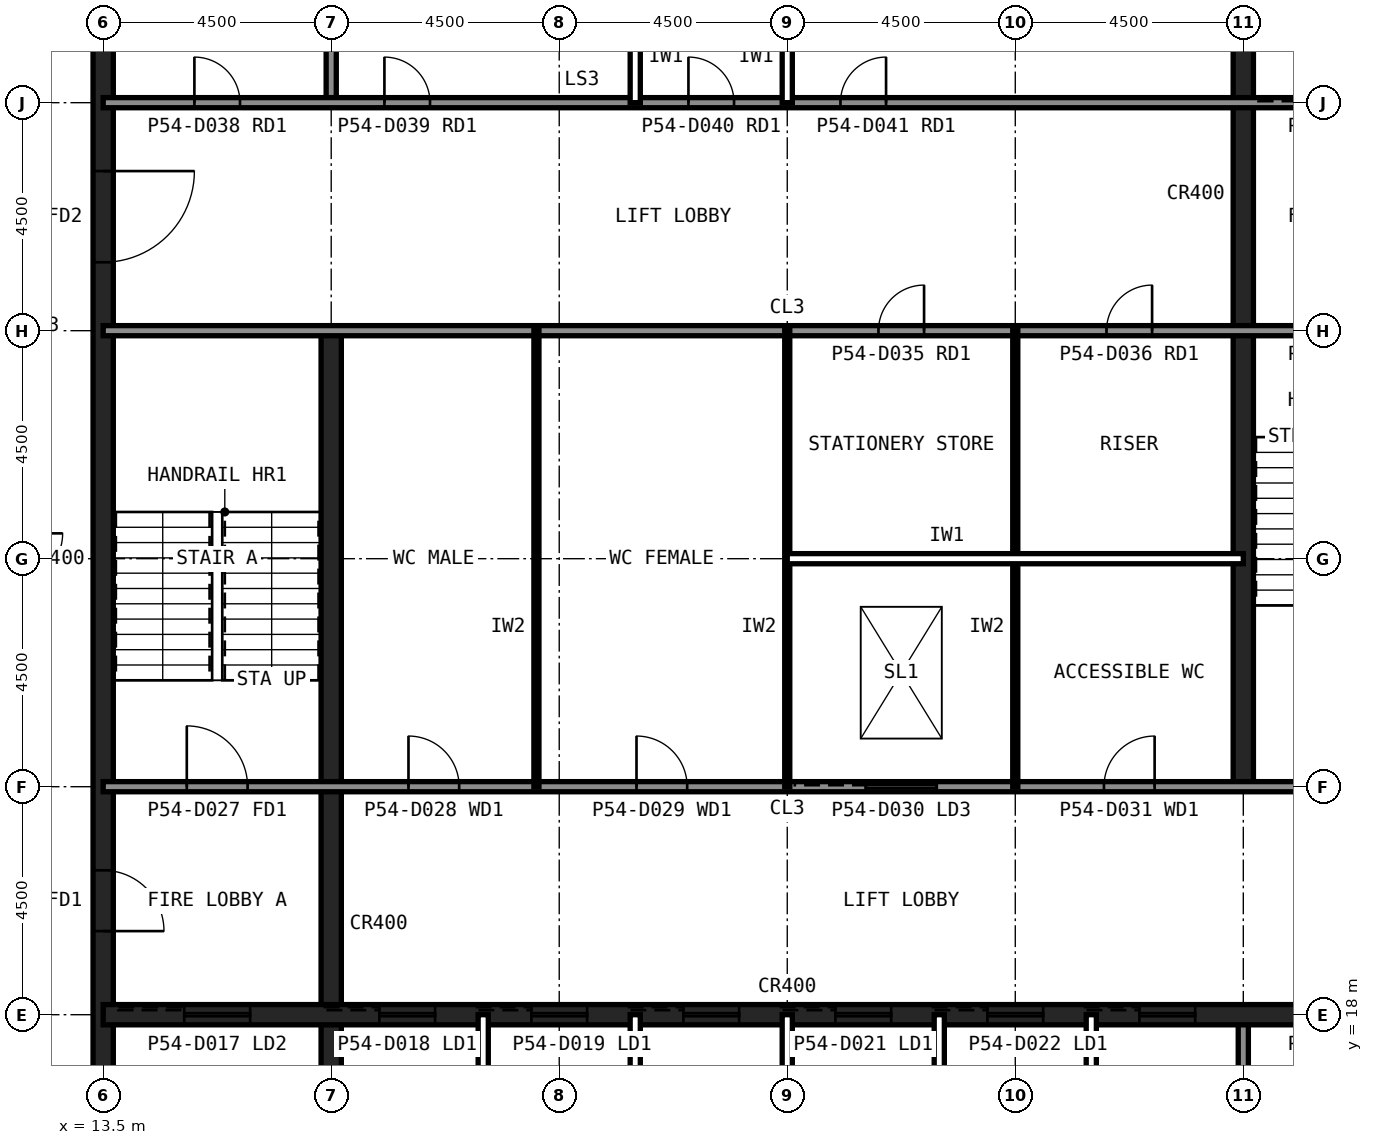
"""IFC4 building model, lengths in metres.
Left out: names, types, materials, properties, quantities, classifications, styles, units other than length and angle.
Written with IfcOpenShell. Run it as: python <this file> out.ifc"""

import sys

from ifc_helpers import new_model, si_unit, direction, frame, frame_2d, origin, place, context, subcontext, project, spatial, rectangle, extrude, element, fill, save


model = new_model("IFC4")
c1 = context("Model", 3, precision=1e-05, world=origin(), true_north=direction((0.0, 1.0)))
c2 = subcontext(c1, "Body", "Model", "MODEL_VIEW")
j1 = project(units=[si_unit("LENGTHUNIT", "METRE"), si_unit("PLANEANGLEUNIT", "RADIAN")], contexts=[c1])
p1 = place(None, origin())
s1 = spatial("IfcSite", under=j1, at=p1, CompositionType="ELEMENT")
p2 = place(p1, origin())
s2 = spatial("IfcBuilding", under=s1, at=p2, CompositionType="ELEMENT")
p3 = place(p2, frame((0.0, 0.0, 230.6)))
s3 = spatial("IfcBuildingStorey", under=s2, at=p3, CompositionType="ELEMENT", Elevation=230.6)
p4 = place(p3, frame((13.5, 40.5, 0.0), z_axis=(0.0, 0.0, 1.0), x_axis=(0.0, -1.0, 0.0)))
e1 = element("IfcWall", 1, at=p4, inside=s3, PredefinedType="SHEAR", context=c2, shape_type="SweptSolid", body=[
    extrude(rectangle(XDim=27.0, YDim=0.4, at=frame_2d((13.5, 0.0))), origin(), (0.0, 0.0, 1.0), 4.0),
])
p5 = place(p4, frame((19.65, 0.0, 0.0)))
e2 = element("IfcOpeningElement", 2, at=p5, cuts=e1, PredefinedType="OPENING", context=c2, shape_type="SweptSolid", body=[
    extrude(rectangle(XDim=1.2, YDim=2.1, at=frame_2d((0.6, 1.05))), frame((0.0, 0.21, 0.0), z_axis=(0.0, -1.0, 0.0), x_axis=(1.0, 0.0, 0.0)), (0.0, 0.0, 1.0), 0.42),
])
p6 = place(p4, frame((5.85, 0.0, 0.0)))
e3 = element("IfcOpeningElement", 3, at=p6, cuts=e1, PredefinedType="OPENING", context=c2, shape_type="SweptSolid", body=[
    extrude(rectangle(XDim=1.8, YDim=2.1, at=frame_2d((0.9, 1.05))), frame((0.0, 0.21, 0.0), z_axis=(0.0, -1.0, 0.0), x_axis=(1.0, 0.0, 0.0)), (0.0, 0.0, 1.0), 0.42),
])
p7 = place(p3, frame((18.0, 13.5, 0.0), z_axis=(0.0, 0.0, 1.0), x_axis=(0.0, 1.0, 0.0)))
e4 = element("IfcWall", 4, at=p7, inside=s3, PredefinedType="SHEAR", context=c2, shape_type="SweptSolid", body=[
    extrude(rectangle(XDim=18.0, YDim=0.4, at=frame_2d((9.0, 0.0))), origin(), (0.0, 0.0, 1.0), 4.0),
])
for number, where, z_axis, x_axis in (
    (5, (18.0, 36.0, 0.0), (0.0, 0.0, 1.0), (0.0, 1.0, 0.0)),
    (6, (36.0, 13.5, 0.0), (0.0, 0.0, 1.0), (0.0, 1.0, 0.0)),
):
    element("IfcWall", number, at=place(p3, frame(where, z_axis=z_axis, x_axis=x_axis)), inside=s3, PredefinedType="SOLIDWALL", context=c2, shape_type="SweptSolid", body=[
        extrude(rectangle(XDim=4.5, YDim=0.2, at=frame_2d((2.25, 0.0))), origin(), (0.0, 0.0, 1.0), 3.84),
    ])
p8 = place(p3, frame((36.0, 22.5, 0.0), z_axis=(0.0, 0.0, 1.0), x_axis=(0.0, 1.0, 0.0)))
e7 = element("IfcWall", 7, at=p8, inside=s3, PredefinedType="SHEAR", context=c2, shape_type="SweptSolid", body=[
    extrude(rectangle(XDim=18.0, YDim=0.4, at=frame_2d((9.0, 0.0))), origin(), (0.0, 0.0, 1.0), 4.0),
])
p9 = place(p3, frame((13.5, 18.0, 0.0), z_axis=(0.0, 0.0, 1.0), x_axis=(1.0, 0.0, 0.0)))
e8 = element("IfcWall", 8, at=p9, inside=s3, PredefinedType="SHEAR", context=c2, shape_type="SweptSolid", body=[
    extrude(rectangle(XDim=27.0, YDim=0.4, at=frame_2d((13.5, 0.0))), origin(), (0.0, 0.0, 1.0), 4.0),
])
p10 = place(p9, frame((24.3, 0.0, 0.0)))
e9 = element("IfcOpeningElement", 9, at=p10, cuts=e8, PredefinedType="OPENING", context=c2, shape_type="SweptSolid", body=[
    extrude(rectangle(XDim=0.9, YDim=2.1, at=frame_2d((0.45, 1.05))), frame((0.0, 0.21, 0.0), z_axis=(0.0, -1.0, 0.0), x_axis=(1.0, 0.0, 0.0)), (0.0, 0.0, 1.0), 0.42),
])
p11 = place(p9, frame((5.45, 0.0, 0.0)))
e10 = element("IfcOpeningElement", 10, at=p11, cuts=e8, PredefinedType="OPENING", context=c2, shape_type="SweptSolid", body=[
    extrude(rectangle(XDim=1.1, YDim=2.1, at=frame_2d((0.55, 1.05))), frame((0.0, 0.21, 0.0), z_axis=(0.0, -1.0, 0.0), x_axis=(1.0, 0.0, 0.0)), (0.0, 0.0, 1.0), 0.42),
])
p12 = place(p9, frame((8.45, 0.0, 0.0)))
e11 = element("IfcOpeningElement", 11, at=p12, cuts=e8, PredefinedType="OPENING", context=c2, shape_type="SweptSolid", body=[
    extrude(rectangle(XDim=1.1, YDim=2.1, at=frame_2d((0.55, 1.05))), frame((0.0, 0.21, 0.0), z_axis=(0.0, -1.0, 0.0), x_axis=(1.0, 0.0, 0.0)), (0.0, 0.0, 1.0), 0.42),
])
p13 = place(p9, frame((11.45, 0.0, 0.0)))
e12 = element("IfcOpeningElement", 12, at=p13, cuts=e8, PredefinedType="OPENING", context=c2, shape_type="SweptSolid", body=[
    extrude(rectangle(XDim=1.1, YDim=2.1, at=frame_2d((0.55, 1.05))), frame((0.0, 0.21, 0.0), z_axis=(0.0, -1.0, 0.0), x_axis=(1.0, 0.0, 0.0)), (0.0, 0.0, 1.0), 0.42),
])
p14 = place(p9, frame((14.45, 0.0, 0.0)))
e13 = element("IfcOpeningElement", 13, at=p14, cuts=e8, PredefinedType="OPENING", context=c2, shape_type="SweptSolid", body=[
    extrude(rectangle(XDim=1.1, YDim=2.1, at=frame_2d((0.55, 1.05))), frame((0.0, 0.21, 0.0), z_axis=(0.0, -1.0, 0.0), x_axis=(1.0, 0.0, 0.0)), (0.0, 0.0, 1.0), 0.42),
])
p15 = place(p9, frame((17.45, 0.0, 0.0)))
e14 = element("IfcOpeningElement", 14, at=p15, cuts=e8, PredefinedType="OPENING", context=c2, shape_type="SweptSolid", body=[
    extrude(rectangle(XDim=1.1, YDim=2.1, at=frame_2d((0.55, 1.05))), frame((0.0, 0.21, 0.0), z_axis=(0.0, -1.0, 0.0), x_axis=(1.0, 0.0, 0.0)), (0.0, 0.0, 1.0), 0.42),
])
p16 = place(p9, frame((20.45, 0.0, 0.0)))
e15 = element("IfcOpeningElement", 15, at=p16, cuts=e8, PredefinedType="OPENING", context=c2, shape_type="SweptSolid", body=[
    extrude(rectangle(XDim=1.1, YDim=2.1, at=frame_2d((0.55, 1.05))), frame((0.0, 0.21, 0.0), z_axis=(0.0, -1.0, 0.0), x_axis=(1.0, 0.0, 0.0)), (0.0, 0.0, 1.0), 0.42),
])
p17 = place(p9, frame((1.6, 0.0, 0.0)))
e16 = element("IfcOpeningElement", 16, at=p17, cuts=e8, PredefinedType="OPENING", context=c2, shape_type="SweptSolid", body=[
    extrude(rectangle(XDim=1.3, YDim=2.2, at=frame_2d((0.65, 1.1))), frame((0.0, 0.21, 0.0), z_axis=(0.0, -1.0, 0.0), x_axis=(1.0, 0.0, 0.0)), (0.0, 0.0, 1.0), 0.42),
])
p18 = place(p3, frame((13.5, 36.0, 0.0), z_axis=(0.0, 0.0, 1.0), x_axis=(1.0, 0.0, 0.0)))
e17 = element("IfcWall", 17, at=p18, inside=s3, PredefinedType="SOLIDWALL", context=c2, shape_type="SweptSolid", body=[
    extrude(rectangle(XDim=27.0, YDim=0.2, at=frame_2d((13.5, 0.0))), origin(), (0.0, 0.0, 1.0), 3.84),
])
p19 = place(p18, frame((1.8, 0.0, 0.0)))
e18 = element("IfcOpeningElement", 18, at=p19, cuts=e17, PredefinedType="OPENING", context=c2, shape_type="SweptSolid", body=[
    extrude(rectangle(XDim=0.9, YDim=2.1, at=frame_2d((0.45, 1.05))), frame((0.0, 0.11, 0.0), z_axis=(0.0, -1.0, 0.0), x_axis=(1.0, 0.0, 0.0)), (0.0, 0.0, 1.0), 0.22),
])
p20 = place(p18, frame((5.55, 0.0, 0.0)))
e19 = element("IfcOpeningElement", 19, at=p20, cuts=e17, PredefinedType="OPENING", context=c2, shape_type="SweptSolid", body=[
    extrude(rectangle(XDim=0.9, YDim=2.1, at=frame_2d((0.45, 1.05))), frame((0.0, 0.11, 0.0), z_axis=(0.0, -1.0, 0.0), x_axis=(1.0, 0.0, 0.0)), (0.0, 0.0, 1.0), 0.22),
])
p21 = place(p18, frame((11.55, 0.0, 0.0)))
e20 = element("IfcOpeningElement", 20, at=p21, cuts=e17, PredefinedType="OPENING", context=c2, shape_type="SweptSolid", body=[
    extrude(rectangle(XDim=0.9, YDim=2.1, at=frame_2d((0.45, 1.05))), frame((0.0, 0.11, 0.0), z_axis=(0.0, -1.0, 0.0), x_axis=(1.0, 0.0, 0.0)), (0.0, 0.0, 1.0), 0.22),
])
p22 = place(p18, frame((14.55, 0.0, 0.0)))
e21 = element("IfcOpeningElement", 21, at=p22, cuts=e17, PredefinedType="OPENING", context=c2, shape_type="SweptSolid", body=[
    extrude(rectangle(XDim=0.9, YDim=2.1, at=frame_2d((0.45, 1.05))), frame((0.0, 0.11, 0.0), z_axis=(0.0, -1.0, 0.0), x_axis=(1.0, 0.0, 0.0)), (0.0, 0.0, 1.0), 0.22),
])
p23 = place(p18, frame((24.1, 0.0, 0.0)))
e22 = element("IfcOpeningElement", 22, at=p23, cuts=e17, PredefinedType="OPENING", context=c2, shape_type="SweptSolid", body=[
    extrude(rectangle(XDim=1.3, YDim=2.2, at=frame_2d((0.65, 1.1))), frame((0.0, 0.11, 0.0), z_axis=(0.0, -1.0, 0.0), x_axis=(1.0, 0.0, 0.0)), (0.0, 0.0, 1.0), 0.22),
])
p24 = place(p3, frame((13.5, 22.5, 0.0), z_axis=(0.0, 0.0, 1.0), x_axis=(1.0, 0.0, 0.0)))
e23 = element("IfcWall", 23, at=p24, inside=s3, PredefinedType="SOLIDWALL", context=c2, shape_type="SweptSolid", body=[
    extrude(rectangle(XDim=27.0, YDim=0.2, at=frame_2d((13.5, 0.0))), origin(), (0.0, 0.0, 1.0), 3.84),
])
p25 = place(p24, frame((1.65, 0.0, 0.0)))
e24 = element("IfcOpeningElement", 24, at=p25, cuts=e23, PredefinedType="OPENING", context=c2, shape_type="SweptSolid", body=[
    extrude(rectangle(XDim=1.2, YDim=2.1, at=frame_2d((0.6, 1.05))), frame((0.0, 0.11, 0.0), z_axis=(0.0, -1.0, 0.0), x_axis=(1.0, 0.0, 0.0)), (0.0, 0.0, 1.0), 0.22),
])
p26 = place(p24, frame((6.025, 0.0, 0.0)))
e25 = element("IfcOpeningElement", 25, at=p26, cuts=e23, PredefinedType="OPENING", context=c2, shape_type="SweptSolid", body=[
    extrude(rectangle(XDim=1.0, YDim=2.1, at=frame_2d((0.5, 1.05))), frame((0.0, 0.11, 0.0), z_axis=(0.0, -1.0, 0.0), x_axis=(1.0, 0.0, 0.0)), (0.0, 0.0, 1.0), 0.22),
])
p27 = place(p24, frame((10.525, 0.0, 0.0)))
e26 = element("IfcOpeningElement", 26, at=p27, cuts=e23, PredefinedType="OPENING", context=c2, shape_type="SweptSolid", body=[
    extrude(rectangle(XDim=1.0, YDim=2.1, at=frame_2d((0.5, 1.05))), frame((0.0, 0.11, 0.0), z_axis=(0.0, -1.0, 0.0), x_axis=(1.0, 0.0, 0.0)), (0.0, 0.0, 1.0), 0.22),
])
p28 = place(p24, frame((19.75, 0.0, 0.0)))
e27 = element("IfcOpeningElement", 27, at=p28, cuts=e23, PredefinedType="OPENING", context=c2, shape_type="SweptSolid", body=[
    extrude(rectangle(XDim=1.0, YDim=2.1, at=frame_2d((0.5, 1.05))), frame((0.0, 0.11, 0.0), z_axis=(0.0, -1.0, 0.0), x_axis=(1.0, 0.0, 0.0)), (0.0, 0.0, 1.0), 0.22),
])
p29 = place(p24, frame((15.05, 0.0, 0.0)))
e28 = element("IfcOpeningElement", 28, at=p29, cuts=e23, PredefinedType="OPENING", context=c2, shape_type="SweptSolid", body=[
    extrude(rectangle(XDim=1.4, YDim=2.4, at=frame_2d((0.7, 1.2))), frame((0.0, 0.11, 0.0), z_axis=(0.0, -1.0, 0.0), x_axis=(1.0, 0.0, 0.0)), (0.0, 0.0, 1.0), 0.22),
])
p30 = place(p3, frame((13.5, 31.5, 0.0), z_axis=(0.0, 0.0, 1.0), x_axis=(1.0, 0.0, 0.0)))
e29 = element("IfcWall", 29, at=p30, inside=s3, PredefinedType="SOLIDWALL", context=c2, shape_type="SweptSolid", body=[
    extrude(rectangle(XDim=27.0, YDim=0.2, at=frame_2d((13.5, 0.0))), origin(), (0.0, 0.0, 1.0), 3.84),
])
p31 = place(p30, frame((24.15, 0.0, 0.0)))
e30 = element("IfcOpeningElement", 30, at=p31, cuts=e29, PredefinedType="OPENING", context=c2, shape_type="SweptSolid", body=[
    extrude(rectangle(XDim=1.2, YDim=2.1, at=frame_2d((0.6, 1.05))), frame((0.0, 0.11, 0.0), z_axis=(0.0, -1.0, 0.0), x_axis=(1.0, 0.0, 0.0)), (0.0, 0.0, 1.0), 0.22),
])
p32 = place(p30, frame((15.3, 0.0, 0.0)))
e31 = element("IfcOpeningElement", 31, at=p32, cuts=e29, PredefinedType="OPENING", context=c2, shape_type="SweptSolid", body=[
    extrude(rectangle(XDim=0.9, YDim=2.1, at=frame_2d((0.45, 1.05))), frame((0.0, 0.11, 0.0), z_axis=(0.0, -1.0, 0.0), x_axis=(1.0, 0.0, 0.0)), (0.0, 0.0, 1.0), 0.22),
])
p33 = place(p30, frame((19.8, 0.0, 0.0)))
e32 = element("IfcOpeningElement", 32, at=p33, cuts=e29, PredefinedType="OPENING", context=c2, shape_type="SweptSolid", body=[
    extrude(rectangle(XDim=0.9, YDim=2.1, at=frame_2d((0.45, 1.05))), frame((0.0, 0.11, 0.0), z_axis=(0.0, -1.0, 0.0), x_axis=(1.0, 0.0, 0.0)), (0.0, 0.0, 1.0), 0.22),
])
for number, where, z_axis, x_axis in (
    (33, (21.0, 13.5, 0.0), (0.0, 0.0, 1.0), (0.0, 1.0, 0.0)),
    (34, (24.0, 13.5, 0.0), (0.0, 0.0, 1.0), (0.0, 1.0, 0.0)),
    (35, (24.0, 36.0, 0.0), (0.0, 0.0, 1.0), (0.0, 1.0, 0.0)),
    (36, (27.0, 13.5, 0.0), (0.0, 0.0, 1.0), (0.0, 1.0, 0.0)),
    (37, (27.0, 36.0, 0.0), (0.0, 0.0, 1.0), (0.0, 1.0, 0.0)),
    (38, (30.0, 13.5, 0.0), (0.0, 0.0, 1.0), (0.0, 1.0, 0.0)),
    (39, (33.0, 13.5, 0.0), (0.0, 0.0, 1.0), (0.0, 1.0, 0.0)),
):
    element("IfcWall", number, at=place(p3, frame(where, z_axis=z_axis, x_axis=x_axis)), inside=s3, PredefinedType="PARTITIONING", context=c2, shape_type="SweptSolid", body=[
        extrude(rectangle(XDim=4.5, YDim=0.2, at=frame_2d((2.25, 0.0))), origin(), (0.0, 0.0, 1.0), 3.84),
    ])
for number, where, z_axis, x_axis in (
    (40, (22.05, 22.5, 0.0), (0.0, 0.0, 1.0), (0.0, 1.0, 0.0)),
    (41, (27.0, 22.5, 0.0), (0.0, 0.0, 1.0), (0.0, 1.0, 0.0)),
    (42, (31.5, 22.5, 0.0), (0.0, 0.0, 1.0), (0.0, 1.0, 0.0)),
):
    element("IfcWall", number, at=place(p3, frame(where, z_axis=z_axis, x_axis=x_axis)), inside=s3, PredefinedType="PLUMBINGWALL", context=c2, shape_type="SweptSolid", body=[
        extrude(rectangle(XDim=9.0, YDim=0.1, at=frame_2d((4.5, 0.0))), origin(), (0.0, 0.0, 1.0), 3.84),
    ])
p34 = place(p3, frame((27.0, 27.0, 0.0), z_axis=(0.0, 0.0, 1.0), x_axis=(1.0, 0.0, 0.0)))
e43 = element("IfcWall", 43, at=p34, inside=s3, PredefinedType="PARTITIONING", context=c2, shape_type="SweptSolid", body=[
    extrude(rectangle(XDim=9.0, YDim=0.2, at=frame_2d((4.5, 0.0))), origin(), (0.0, 0.0, 1.0), 3.84),
])
p35 = place(p5, origin())
e44 = element("IfcDoor", 44, at=p35, inside=s3, OperationType="SINGLE_SWING_RIGHT", PredefinedType="DOOR", context=c2, shape_type="SweptSolid", body=[
    extrude(rectangle(XDim=1.2, YDim=2.1, at=frame_2d((0.6, 1.05))), frame((0.0, 0.025, 0.0), z_axis=(0.0, -1.0, 0.0), x_axis=(1.0, 0.0, 0.0)), (0.0, 0.0, 1.0), 0.05),
])
fill(e2, e44)
p36 = place(p6, origin())
e45 = element("IfcDoor", 45, at=p36, inside=s3, OperationType="SINGLE_SWING_LEFT", PredefinedType="DOOR", context=c2, shape_type="SweptSolid", body=[
    extrude(rectangle(XDim=1.8, YDim=2.1, at=frame_2d((0.9, 1.05))), frame((0.0, 0.025, 0.0), z_axis=(0.0, -1.0, 0.0), x_axis=(1.0, 0.0, 0.0)), (0.0, 0.0, 1.0), 0.05),
])
fill(e3, e45)
p37 = place(p25, origin())
e46 = element("IfcDoor", 46, at=p37, inside=s3, OperationType="SINGLE_SWING_LEFT", PredefinedType="DOOR", context=c2, shape_type="SweptSolid", body=[
    extrude(rectangle(XDim=1.2, YDim=2.1, at=frame_2d((0.6, 1.05))), frame((0.0, 0.025, 0.0), z_axis=(0.0, -1.0, 0.0), x_axis=(1.0, 0.0, 0.0)), (0.0, 0.0, 1.0), 0.05),
])
fill(e24, e46)
p38 = place(p26, origin())
e47 = element("IfcDoor", 47, at=p38, inside=s3, OperationType="SINGLE_SWING_LEFT", PredefinedType="DOOR", context=c2, shape_type="SweptSolid", body=[
    extrude(rectangle(XDim=1.0, YDim=2.1, at=frame_2d((0.5, 1.05))), frame((0.0, 0.025, 0.0), z_axis=(0.0, -1.0, 0.0), x_axis=(1.0, 0.0, 0.0)), (0.0, 0.0, 1.0), 0.05),
])
fill(e25, e47)
p39 = place(p27, origin())
e48 = element("IfcDoor", 48, at=p39, inside=s3, OperationType="SINGLE_SWING_LEFT", PredefinedType="DOOR", context=c2, shape_type="SweptSolid", body=[
    extrude(rectangle(XDim=1.0, YDim=2.1, at=frame_2d((0.5, 1.05))), frame((0.0, 0.025, 0.0), z_axis=(0.0, -1.0, 0.0), x_axis=(1.0, 0.0, 0.0)), (0.0, 0.0, 1.0), 0.05),
])
fill(e26, e48)
p40 = place(p28, origin())
e49 = element("IfcDoor", 49, at=p40, inside=s3, OperationType="SINGLE_SWING_RIGHT", PredefinedType="DOOR", context=c2, shape_type="SweptSolid", body=[
    extrude(rectangle(XDim=1.0, YDim=2.1, at=frame_2d((0.5, 1.05))), frame((0.0, 0.025, 0.0), z_axis=(0.0, -1.0, 0.0), x_axis=(1.0, 0.0, 0.0)), (0.0, 0.0, 1.0), 0.05),
])
fill(e27, e49)
p41 = place(p32, origin())
e50 = element("IfcDoor", 50, at=p41, inside=s3, OperationType="SINGLE_SWING_RIGHT", PredefinedType="DOOR", context=c2, shape_type="SweptSolid", body=[
    extrude(rectangle(XDim=0.9, YDim=2.1, at=frame_2d((0.45, 1.05))), frame((0.0, 0.025, 0.0), z_axis=(0.0, -1.0, 0.0), x_axis=(1.0, 0.0, 0.0)), (0.0, 0.0, 1.0), 0.05),
])
fill(e31, e50)
p42 = place(p33, origin())
e51 = element("IfcDoor", 51, at=p42, inside=s3, OperationType="SINGLE_SWING_RIGHT", PredefinedType="DOOR", context=c2, shape_type="SweptSolid", body=[
    extrude(rectangle(XDim=0.9, YDim=2.1, at=frame_2d((0.45, 1.05))), frame((0.0, 0.025, 0.0), z_axis=(0.0, -1.0, 0.0), x_axis=(1.0, 0.0, 0.0)), (0.0, 0.0, 1.0), 0.05),
])
fill(e32, e51)
p43 = place(p19, origin())
e52 = element("IfcDoor", 52, at=p43, inside=s3, OperationType="SINGLE_SWING_LEFT", PredefinedType="DOOR", context=c2, shape_type="SweptSolid", body=[
    extrude(rectangle(XDim=0.9, YDim=2.1, at=frame_2d((0.45, 1.05))), frame((0.0, 0.025, 0.0), z_axis=(0.0, -1.0, 0.0), x_axis=(1.0, 0.0, 0.0)), (0.0, 0.0, 1.0), 0.05),
])
fill(e18, e52)
p44 = place(p20, origin())
e53 = element("IfcDoor", 53, at=p44, inside=s3, OperationType="SINGLE_SWING_LEFT", PredefinedType="DOOR", context=c2, shape_type="SweptSolid", body=[
    extrude(rectangle(XDim=0.9, YDim=2.1, at=frame_2d((0.45, 1.05))), frame((0.0, 0.025, 0.0), z_axis=(0.0, -1.0, 0.0), x_axis=(1.0, 0.0, 0.0)), (0.0, 0.0, 1.0), 0.05),
])
fill(e19, e53)
p45 = place(p21, origin())
e54 = element("IfcDoor", 54, at=p45, inside=s3, OperationType="SINGLE_SWING_LEFT", PredefinedType="DOOR", context=c2, shape_type="SweptSolid", body=[
    extrude(rectangle(XDim=0.9, YDim=2.1, at=frame_2d((0.45, 1.05))), frame((0.0, 0.025, 0.0), z_axis=(0.0, -1.0, 0.0), x_axis=(1.0, 0.0, 0.0)), (0.0, 0.0, 1.0), 0.05),
])
fill(e20, e54)
p46 = place(p22, origin())
e55 = element("IfcDoor", 55, at=p46, inside=s3, OperationType="SINGLE_SWING_RIGHT", PredefinedType="DOOR", context=c2, shape_type="SweptSolid", body=[
    extrude(rectangle(XDim=0.9, YDim=2.1, at=frame_2d((0.45, 1.05))), frame((0.0, 0.025, 0.0), z_axis=(0.0, -1.0, 0.0), x_axis=(1.0, 0.0, 0.0)), (0.0, 0.0, 1.0), 0.05),
])
fill(e21, e55)
p47 = place(p11, origin())
e56 = element("IfcDoor", 56, at=p47, inside=s3, OperationType="SLIDING_TO_LEFT", PredefinedType="DOOR", context=c2, shape_type="SweptSolid", body=[
    extrude(rectangle(XDim=1.1, YDim=2.1, at=frame_2d((0.55, 1.05))), frame((0.0, 0.025, 0.0), z_axis=(0.0, -1.0, 0.0), x_axis=(1.0, 0.0, 0.0)), (0.0, 0.0, 1.0), 0.05),
])
fill(e10, e56)
p48 = place(p12, origin())
e57 = element("IfcDoor", 57, at=p48, inside=s3, OperationType="SLIDING_TO_LEFT", PredefinedType="DOOR", context=c2, shape_type="SweptSolid", body=[
    extrude(rectangle(XDim=1.1, YDim=2.1, at=frame_2d((0.55, 1.05))), frame((0.0, 0.025, 0.0), z_axis=(0.0, -1.0, 0.0), x_axis=(1.0, 0.0, 0.0)), (0.0, 0.0, 1.0), 0.05),
])
fill(e11, e57)
p49 = place(p13, origin())
e58 = element("IfcDoor", 58, at=p49, inside=s3, OperationType="SLIDING_TO_LEFT", PredefinedType="DOOR", context=c2, shape_type="SweptSolid", body=[
    extrude(rectangle(XDim=1.1, YDim=2.1, at=frame_2d((0.55, 1.05))), frame((0.0, 0.025, 0.0), z_axis=(0.0, -1.0, 0.0), x_axis=(1.0, 0.0, 0.0)), (0.0, 0.0, 1.0), 0.05),
])
fill(e12, e58)
p50 = place(p14, origin())
e59 = element("IfcDoor", 59, at=p50, inside=s3, OperationType="SLIDING_TO_LEFT", PredefinedType="DOOR", context=c2, shape_type="SweptSolid", body=[
    extrude(rectangle(XDim=1.1, YDim=2.1, at=frame_2d((0.55, 1.05))), frame((0.0, 0.025, 0.0), z_axis=(0.0, -1.0, 0.0), x_axis=(1.0, 0.0, 0.0)), (0.0, 0.0, 1.0), 0.05),
])
fill(e13, e59)
p51 = place(p15, origin())
e60 = element("IfcDoor", 60, at=p51, inside=s3, OperationType="SLIDING_TO_LEFT", PredefinedType="DOOR", context=c2, shape_type="SweptSolid", body=[
    extrude(rectangle(XDim=1.1, YDim=2.1, at=frame_2d((0.55, 1.05))), frame((0.0, 0.025, 0.0), z_axis=(0.0, -1.0, 0.0), x_axis=(1.0, 0.0, 0.0)), (0.0, 0.0, 1.0), 0.05),
])
fill(e14, e60)
p52 = place(p16, origin())
e61 = element("IfcDoor", 61, at=p52, inside=s3, OperationType="SLIDING_TO_LEFT", PredefinedType="DOOR", context=c2, shape_type="SweptSolid", body=[
    extrude(rectangle(XDim=1.1, YDim=2.1, at=frame_2d((0.55, 1.05))), frame((0.0, 0.025, 0.0), z_axis=(0.0, -1.0, 0.0), x_axis=(1.0, 0.0, 0.0)), (0.0, 0.0, 1.0), 0.05),
])
fill(e15, e61)
p53 = place(p17, origin())
e62 = element("IfcDoor", 62, at=p53, inside=s3, OperationType="SLIDING_TO_LEFT", PredefinedType="DOOR", context=c2, shape_type="SweptSolid", body=[
    extrude(rectangle(XDim=1.3, YDim=2.2, at=frame_2d((0.65, 1.1))), frame((0.0, 0.025, 0.0), z_axis=(0.0, -1.0, 0.0), x_axis=(1.0, 0.0, 0.0)), (0.0, 0.0, 1.0), 0.05),
])
fill(e16, e62)
p54 = place(p29, origin())
e63 = element("IfcDoor", 63, at=p54, inside=s3, OperationType="SLIDING_TO_LEFT", PredefinedType="DOOR", context=c2, shape_type="SweptSolid", body=[
    extrude(rectangle(XDim=1.4, YDim=2.4, at=frame_2d((0.7, 1.2))), frame((0.0, 0.025, 0.0), z_axis=(0.0, -1.0, 0.0), x_axis=(1.0, 0.0, 0.0)), (0.0, 0.0, 1.0), 0.05),
])
fill(e28, e63)
save(model, sys.argv[1])
